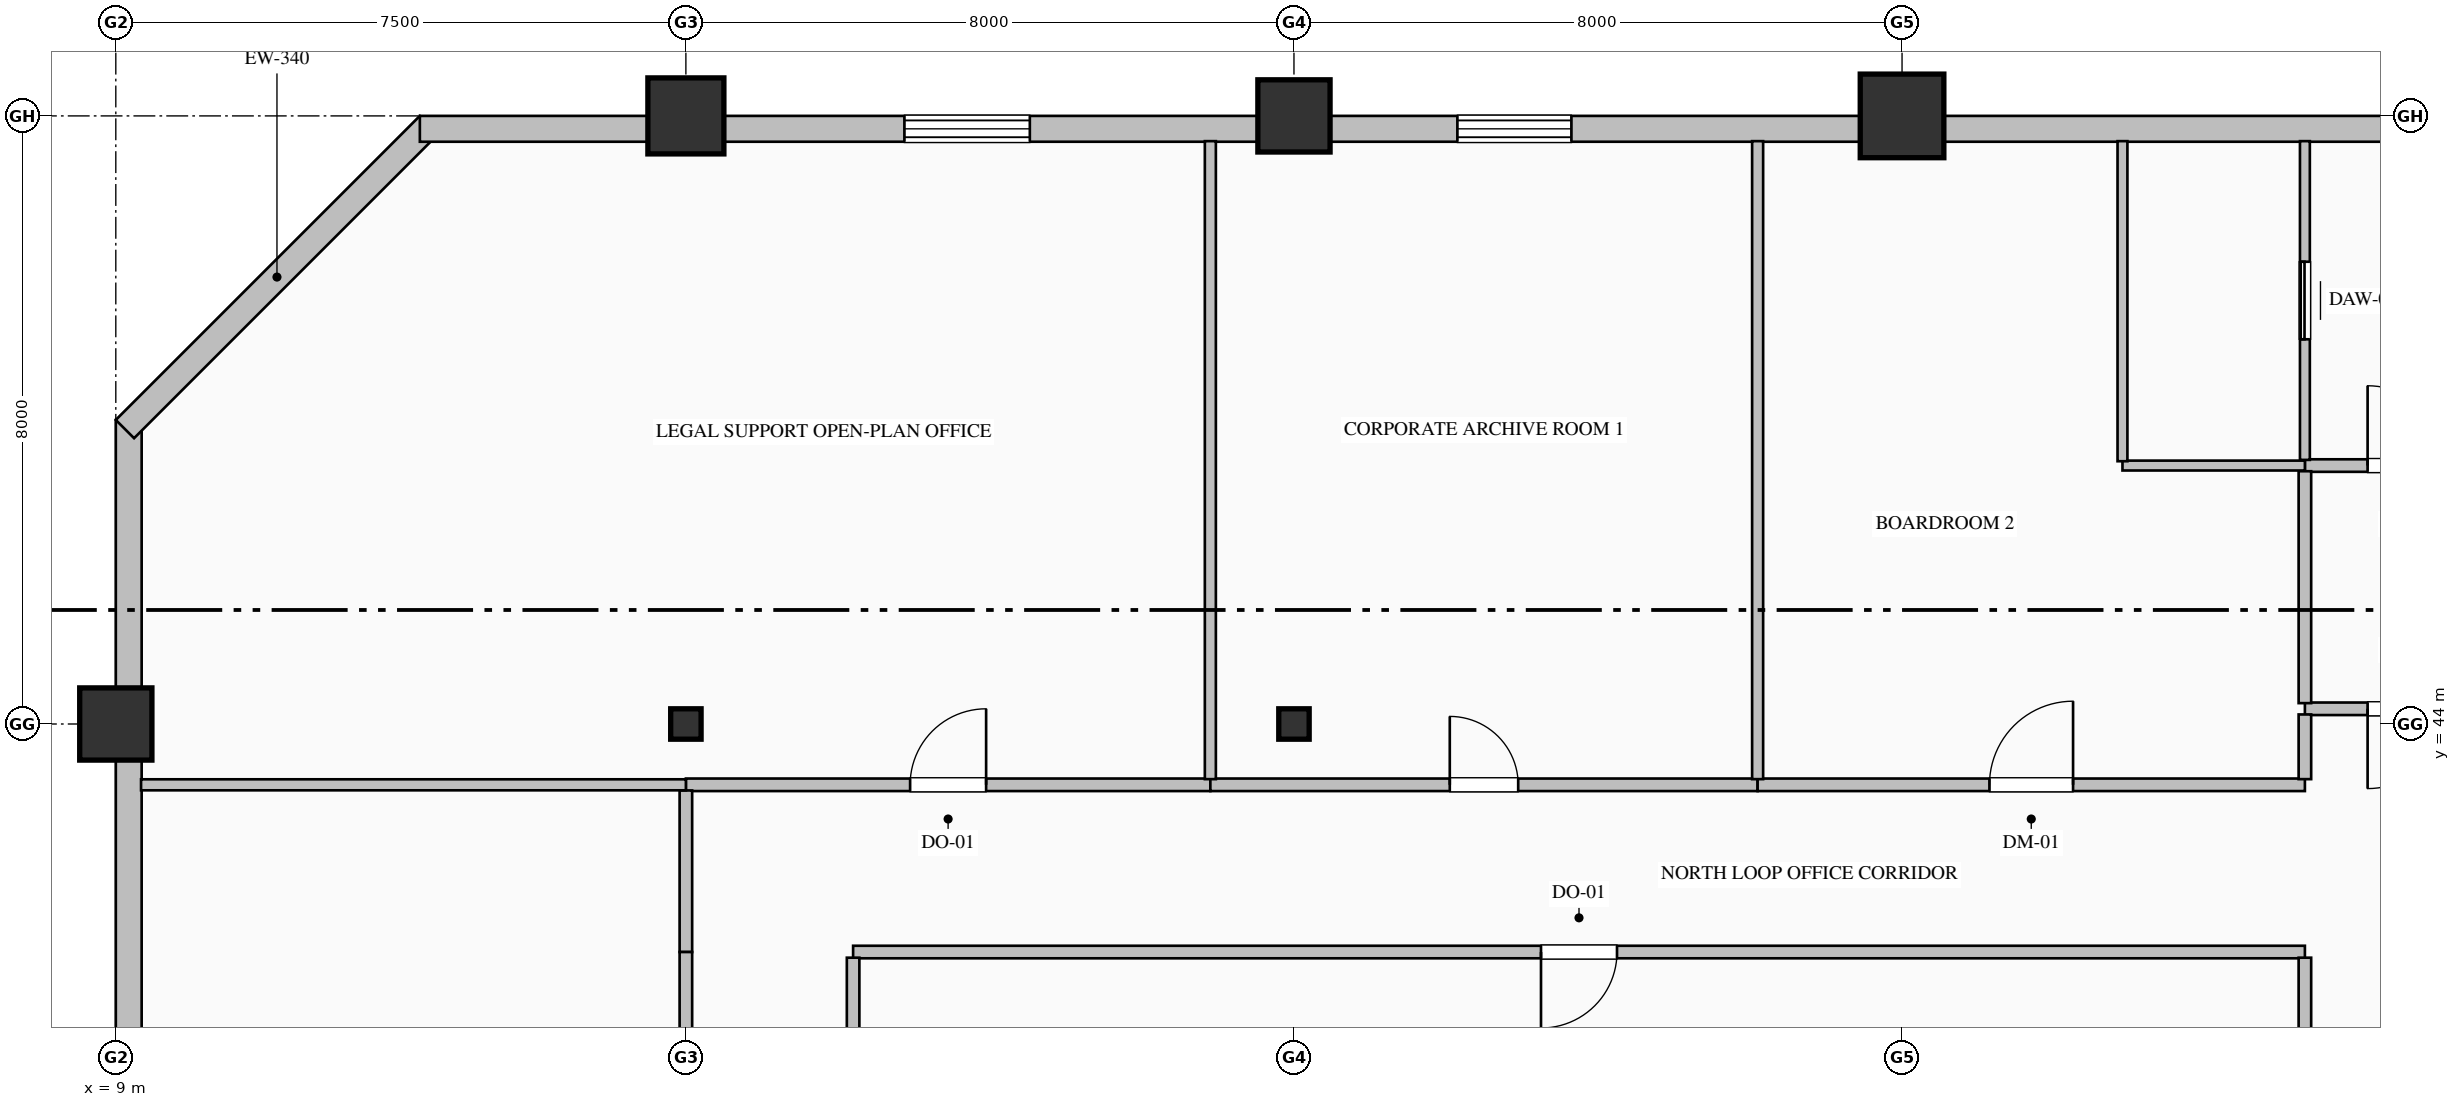
"""IFC4 building model, lengths in metres.
Left out: names, types, materials, properties, quantities, classifications, styles, units other than length and angle.
Written with IfcOpenShell. Run it as: python <this file> out.ifc"""

import sys

from ifc_helpers import new_model, si_unit, direction, frame, frame_2d, origin, origin_2d, place, context, subcontext, project, spatial, rectangle, hollow_rectangle, hollow_circle, i_section, extrude, element, fill, save


model = new_model("IFC4")
c1 = context("Model", 3, precision=1e-05, world=origin(), true_north=direction((0.0, 1.0)))
c2 = subcontext(c1, "Body", "Model", "MODEL_VIEW")
j1 = project(units=[si_unit("LENGTHUNIT", "METRE"), si_unit("PLANEANGLEUNIT", "RADIAN")], contexts=[c1])
p1 = place(None, origin())
s1 = spatial("IfcSite", under=j1, at=p1, CompositionType="ELEMENT")
p2 = place(p1, origin())
s2 = spatial("IfcBuilding", under=s1, at=p2, CompositionType="ELEMENT")
p3 = place(p2, frame((0.0, 0.0, 191.0)))
s3 = spatial("IfcBuildingStorey", under=s2, at=p3, CompositionType="ELEMENT", Elevation=191.0)
p4 = place(p3, frame((9.0, 44.0, 0.0), z_axis=(0.0, 0.0, 1.0), x_axis=(1.0, 0.0, 0.0)))
e1 = element("IfcColumn", 1, at=p4, inside=s3, PredefinedType="COLUMN", context=c2, shape_type="SweptSolid", body=[
    extrude(hollow_rectangle(XDim=0.95, YDim=0.95, WallThickness=0.036, at=origin_2d()), origin(), (0.0, 0.0, 1.0), 4.0),
])
p5 = place(p3, frame((16.5, 44.0, 0.0), z_axis=(0.0, 0.0, 1.0), x_axis=(1.0, 0.0, 0.0)))
e2 = element("IfcColumn", 2, at=p5, inside=s3, PredefinedType="COLUMN", context=c2, shape_type="SweptSolid", body=[
    extrude(i_section(OverallWidth=0.4, OverallDepth=0.4, WebThickness=0.013, FlangeThickness=0.021, FilletRadius=0.022, at=origin_2d()), origin(), (0.0, 0.0, 1.0), 4.0),
])
p6 = place(p3, frame((16.5, 52.0, 0.0), z_axis=(0.0, 0.0, 1.0), x_axis=(1.0, 0.0, 0.0)))
e3 = element("IfcColumn", 3, at=p6, inside=s3, PredefinedType="COLUMN", context=c2, shape_type="SweptSolid", body=[
    extrude(hollow_circle(Radius=0.5, WallThickness=0.036, at=origin_2d()), origin(), (0.0, 0.0, 1.0), 4.0),
])
p7 = place(p3, frame((24.5, 44.0, 0.0), z_axis=(0.0, 0.0, 1.0), x_axis=(1.0, 0.0, 0.0)))
e4 = element("IfcColumn", 4, at=p7, inside=s3, PredefinedType="COLUMN", context=c2, shape_type="SweptSolid", body=[
    extrude(i_section(OverallWidth=0.4, OverallDepth=0.4, WebThickness=0.013, FlangeThickness=0.021, FilletRadius=0.022, at=origin_2d()), origin(), (0.0, 0.0, 1.0), 4.0),
])
p8 = place(p3, frame((24.5, 52.0, 0.0), z_axis=(0.0, 0.0, 1.0), x_axis=(1.0, 0.0, 0.0)))
e5 = element("IfcColumn", 5, at=p8, inside=s3, PredefinedType="COLUMN", context=c2, shape_type="SweptSolid", body=[
    extrude(hollow_rectangle(XDim=0.95, YDim=0.95, WallThickness=0.036, at=origin_2d()), origin(), (0.0, 0.0, 1.0), 4.0),
])
p9 = place(p3, frame((32.5, 52.0, 0.0), z_axis=(0.0, 0.0, 1.0), x_axis=(1.0, 0.0, 0.0)))
e6 = element("IfcColumn", 6, at=p9, inside=s3, PredefinedType="COLUMN", context=c2, shape_type="SweptSolid", body=[
    extrude(hollow_rectangle(XDim=1.1, YDim=1.1, WallThickness=0.04, at=origin_2d()), origin(), (0.0, 0.0, 1.0), 4.0),
])
p10 = place(p3, frame((9.17, 32.0, 0.0), z_axis=(0.0, 0.0, 1.0), x_axis=(0.0, 1.0, 0.0)))
e7 = element("IfcWall", 7, at=p10, inside=s3, PredefinedType="SOLIDWALL", context=c2, shape_type="SweptSolid", body=[
    extrude(rectangle(XDim=16.0, YDim=0.34, at=frame_2d((8.0, 0.0))), origin(), (0.0, 0.0, 1.0), 3.15),
])
p11 = place(p10, frame((6.6, 0.0, 0.7)))
e8 = element("IfcOpeningElement", 8, at=p11, cuts=e7, PredefinedType="OPENING", context=c2, shape_type="SweptSolid", body=[
    extrude(rectangle(XDim=1.2, YDim=1.85, at=frame_2d((0.6, 0.925))), frame((0.0, 0.18, 0.0), z_axis=(0.0, -1.0, 0.0), x_axis=(1.0, 0.0, 0.0)), (0.0, 0.0, 1.0), 0.36),
])
p12 = place(p3, frame((9.12, 47.88, 0.0), z_axis=(0.0, 0.0, 1.0), x_axis=(0.707106781187, 0.707106781187, 0.0)))
e9 = element("IfcWall", 9, at=p12, inside=s3, PredefinedType="SOLIDWALL", context=c2, shape_type="SweptSolid", body=[
    extrude(rectangle(XDim=5.657, YDim=0.34, at=frame_2d((2.828, 0.0))), origin(), (0.0, 0.0, 1.0), 3.65),
])
p13 = place(p3, frame((13.0, 51.83, 0.0), z_axis=(0.0, 0.0, 1.0), x_axis=(1.0, 0.0, 0.0)))
e10 = element("IfcWall", 10, at=p13, inside=s3, PredefinedType="SOLIDWALL", context=c2, shape_type="SweptSolid", body=[
    extrude(rectangle(XDim=27.52, YDim=0.34, at=frame_2d((13.76, 0.0))), origin(), (0.0, 0.0, 1.0), 3.15),
])
p14 = place(p13, frame((6.375, 0.0, 0.85)))
e11 = element("IfcOpeningElement", 11, at=p14, cuts=e10, PredefinedType="OPENING", context=c2, shape_type="SweptSolid", body=[
    extrude(rectangle(XDim=1.65, YDim=1.95, at=frame_2d((0.825, 0.975))), frame((0.0, 0.18, 0.0), z_axis=(0.0, -1.0, 0.0), x_axis=(1.0, 0.0, 0.0)), (0.0, 0.0, 1.0), 0.36),
])
p15 = place(p13, frame((13.65, 0.0, 0.85)))
e12 = element("IfcOpeningElement", 12, at=p15, cuts=e10, PredefinedType="OPENING", context=c2, shape_type="SweptSolid", body=[
    extrude(rectangle(XDim=1.5, YDim=1.95, at=frame_2d((0.75, 0.975))), frame((0.0, 0.18, 0.0), z_axis=(0.0, -1.0, 0.0), x_axis=(1.0, 0.0, 0.0)), (0.0, 0.0, 1.0), 0.36),
])
p16 = place(p3, frame((37.8, 47.4, 0.0), z_axis=(0.0, 0.0, 1.0), x_axis=(1.0, 0.0, 0.0)))
e13 = element("IfcWall", 13, at=p16, inside=s3, PredefinedType="PARTITIONING", context=c2, shape_type="SweptSolid", body=[
    extrude(rectangle(XDim=2.7, YDim=0.165, at=frame_2d((1.35, 0.0))), origin(), (0.0, 0.0, 1.0), 3.65),
])
p17 = place(p16, frame((0.825, 0.0, 0.0)))
e14 = element("IfcOpeningElement", 14, at=p17, cuts=e13, PredefinedType="OPENING", context=c2, shape_type="SweptSolid", body=[
    extrude(rectangle(XDim=1.05, YDim=2.15, at=frame_2d((0.525, 1.075))), frame((0.0, 0.093, 0.0), z_axis=(0.0, -1.0, 0.0), x_axis=(1.0, 0.0, 0.0)), (0.0, 0.0, 1.0), 0.185),
])
p18 = place(p3, frame((40.5, 44.2, 0.0), z_axis=(0.0, 0.0, 1.0), x_axis=(-1.0, 0.0, 0.0)))
e15 = element("IfcWall", 15, at=p18, inside=s3, PredefinedType="PARTITIONING", context=c2, shape_type="SweptSolid", body=[
    extrude(rectangle(XDim=2.7, YDim=0.165, at=frame_2d((1.35, 0.0))), origin(), (0.0, 0.0, 1.0), 3.65),
])
p19 = place(p18, frame((0.825, 0.0, 0.0)))
e16 = element("IfcOpeningElement", 16, at=p19, cuts=e15, PredefinedType="OPENING", context=c2, shape_type="SweptSolid", body=[
    extrude(rectangle(XDim=1.05, YDim=2.15, at=frame_2d((0.525, 1.075))), frame((0.0, 0.093, 0.0), z_axis=(0.0, -1.0, 0.0), x_axis=(1.0, 0.0, 0.0)), (0.0, 0.0, 1.0), 0.185),
])
p20 = place(p3, frame((37.8, 44.274, 0.0), z_axis=(0.0, 0.0, 1.0), x_axis=(0.0, 1.0, 0.0)))
e17 = element("IfcWall", 17, at=p20, inside=s3, PredefinedType="PARTITIONING", context=c2, shape_type="SweptSolid", body=[
    extrude(rectangle(XDim=3.051, YDim=0.165, at=frame_2d((1.525, 0.0))), origin(), (0.0, 0.0, 1.0), 3.65),
])
p21 = place(p3, frame((37.8, 47.475, 0.0), z_axis=(0.0, 0.0, 1.0), x_axis=(0.0, 1.0, 0.0)))
e18 = element("IfcWall", 18, at=p21, inside=s3, PredefinedType="PARTITIONING", context=c2, shape_type="SweptSolid", body=[
    extrude(rectangle(XDim=4.193, YDim=0.13, at=frame_2d((2.097, 0.0))), origin(), (0.0, 0.0, 1.0), 3.65),
])
p22 = place(p21, frame((1.587, 0.0, 0.0)))
e19 = element("IfcOpeningElement", 19, at=p22, cuts=e18, PredefinedType="OPENING", context=c2, shape_type="SweptSolid", body=[
    extrude(rectangle(XDim=1.02, YDim=2.15, at=frame_2d((0.51, 1.075))), frame((0.0, 0.075, 0.0), z_axis=(0.0, -1.0, 0.0), x_axis=(1.0, 0.0, 0.0)), (0.0, 0.0, 1.0), 0.15),
])
p23 = place(p3, frame((37.8, 47.4, 0.0), z_axis=(0.0, 0.0, 1.0), x_axis=(-1.0, 0.0, 0.0)))
e20 = element("IfcWall", 20, at=p23, inside=s3, PredefinedType="PARTITIONING", context=c2, shape_type="SweptSolid", body=[
    extrude(rectangle(XDim=2.4, YDim=0.13, at=frame_2d((1.2, 0.0))), origin(), (0.0, 0.0, 1.0), 3.65),
])
p24 = place(p3, frame((35.4, 47.457, 0.0), z_axis=(0.0, 0.0, 1.0), x_axis=(0.0, 1.0, 0.0)))
e21 = element("IfcWall", 21, at=p24, inside=s3, PredefinedType="PARTITIONING", context=c2, shape_type="SweptSolid", body=[
    extrude(rectangle(XDim=4.211, YDim=0.13, at=frame_2d((2.105, 0.0))), origin(), (0.0, 0.0, 1.0), 3.65),
])
p25 = place(p3, frame((16.5, 43.2, 0.0), z_axis=(0.0, 0.0, 1.0), x_axis=(1.0, 0.0, 0.0)))
e22 = element("IfcWall", 22, at=p25, inside=s3, PredefinedType="PARTITIONING", context=c2, shape_type="SweptSolid", body=[
    extrude(rectangle(XDim=6.9, YDim=0.165, at=frame_2d((3.45, 0.0))), origin(), (0.0, 0.0, 1.0), 3.65),
])
p26 = place(p25, frame((2.95, 0.0, 0.0)))
e23 = element("IfcOpeningElement", 23, at=p26, cuts=e22, PredefinedType="OPENING", context=c2, shape_type="SweptSolid", body=[
    extrude(rectangle(XDim=1.0, YDim=2.15, at=frame_2d((0.5, 1.075))), frame((0.0, 0.093, 0.0), z_axis=(0.0, -1.0, 0.0), x_axis=(1.0, 0.0, 0.0)), (0.0, 0.0, 1.0), 0.185),
])
p27 = place(p3, frame((23.4, 43.2, 0.0), z_axis=(0.0, 0.0, 1.0), x_axis=(1.0, 0.0, 0.0)))
e24 = element("IfcWall", 24, at=p27, inside=s3, PredefinedType="PARTITIONING", context=c2, shape_type="SweptSolid", body=[
    extrude(rectangle(XDim=7.2, YDim=0.165, at=frame_2d((3.6, 0.0))), origin(), (0.0, 0.0, 1.0), 3.65),
])
p28 = place(p27, frame((3.15, 0.0, 0.0)))
e25 = element("IfcOpeningElement", 25, at=p28, cuts=e24, PredefinedType="OPENING", context=c2, shape_type="SweptSolid", body=[
    extrude(rectangle(XDim=0.9, YDim=2.15, at=frame_2d((0.45, 1.075))), frame((0.0, 0.093, 0.0), z_axis=(0.0, -1.0, 0.0), x_axis=(1.0, 0.0, 0.0)), (0.0, 0.0, 1.0), 0.185),
])
p29 = place(p3, frame((30.6, 43.2, 0.0), z_axis=(0.0, 0.0, 1.0), x_axis=(1.0, 0.0, 0.0)))
e26 = element("IfcWall", 26, at=p29, inside=s3, PredefinedType="PARTITIONING", context=c2, shape_type="SweptSolid", body=[
    extrude(rectangle(XDim=7.2, YDim=0.165, at=frame_2d((3.6, 0.0))), origin(), (0.0, 0.0, 1.0), 3.65),
])
p30 = place(p29, frame((3.05, 0.0, 0.0)))
e27 = element("IfcOpeningElement", 27, at=p30, cuts=e26, PredefinedType="OPENING", context=c2, shape_type="SweptSolid", body=[
    extrude(rectangle(XDim=1.1, YDim=2.2, at=frame_2d((0.55, 1.1))), frame((0.0, 0.093, 0.0), z_axis=(0.0, -1.0, 0.0), x_axis=(1.0, 0.0, 0.0)), (0.0, 0.0, 1.0), 0.185),
])
p31 = place(p3, frame((37.8, 41.0, 0.0), z_axis=(0.0, 0.0, 1.0), x_axis=(-1.0, 0.0, 0.0)))
e28 = element("IfcWall", 28, at=p31, inside=s3, PredefinedType="PARTITIONING", context=c2, shape_type="SweptSolid", body=[
    extrude(rectangle(XDim=19.1, YDim=0.165, at=frame_2d((9.55, 0.0))), origin(), (0.0, 0.0, 1.0), 3.65),
])
p32 = place(p31, frame((9.05, 0.0, 0.0)))
e29 = element("IfcOpeningElement", 29, at=p32, cuts=e28, PredefinedType="OPENING", context=c2, shape_type="SweptSolid", body=[
    extrude(rectangle(XDim=1.0, YDim=2.15, at=frame_2d((0.5, 1.075))), frame((0.0, 0.093, 0.0), z_axis=(0.0, -1.0, 0.0), x_axis=(1.0, 0.0, 0.0)), (0.0, 0.0, 1.0), 0.185),
])
p33 = place(p3, frame((16.5, 41.0, 0.0), z_axis=(0.0, 0.0, 1.0), x_axis=(0.0, 1.0, 0.0)))
e30 = element("IfcWall", 30, at=p33, inside=s3, PredefinedType="PARTITIONING", context=c2, shape_type="SweptSolid", body=[
    extrude(rectangle(XDim=2.125, YDim=0.165, at=frame_2d((1.063, 0.0))), origin(), (0.0, 0.0, 1.0), 3.042),
])
p34 = place(p3, frame((18.7, 40.926, 0.0), z_axis=(0.0, 0.0, 1.0), x_axis=(0.0, -1.0, 0.0)))
e31 = element("IfcWall", 31, at=p34, inside=s3, PredefinedType="PARTITIONING", context=c2, shape_type="SweptSolid", body=[
    extrude(rectangle(XDim=3.661, YDim=0.165, at=frame_2d((1.831, 0.0))), origin(), (0.0, 0.0, 1.0), 3.65),
])
p35 = place(p3, frame((16.5, 33.4, 0.0), z_axis=(0.0, 0.0, 1.0), x_axis=(0.0, 1.0, 0.0)))
e32 = element("IfcWall", 32, at=p35, inside=s3, PredefinedType="PARTITIONING", context=c2, shape_type="SweptSolid", body=[
    extrude(rectangle(XDim=7.6, YDim=0.165, at=frame_2d((3.8, 0.0))), origin(), (0.0, 0.0, 1.0), 3.042),
])
p36 = place(p35, frame((3.3, 0.0, 0.0)))
e33 = element("IfcOpeningElement", 33, at=p36, cuts=e32, PredefinedType="OPENING", context=c2, shape_type="SweptSolid", body=[
    extrude(rectangle(XDim=1.0, YDim=2.15, at=frame_2d((0.5, 1.075))), frame((0.0, 0.093, 0.0), z_axis=(0.0, -1.0, 0.0), x_axis=(1.0, 0.0, 0.0)), (0.0, 0.0, 1.0), 0.185),
])
p37 = place(p3, frame((37.8, 43.274, 0.0), z_axis=(0.0, 0.0, 1.0), x_axis=(0.0, 1.0, 0.0)))
e34 = element("IfcWall", 34, at=p37, inside=s3, PredefinedType="PARTITIONING", context=c2, shape_type="SweptSolid", body=[
    extrude(rectangle(XDim=0.851, YDim=0.165, at=frame_2d((0.426, 0.0))), origin(), (0.0, 0.0, 1.0), 3.65),
])
p38 = place(p3, frame((37.8, 37.264, 0.0), z_axis=(0.0, 0.0, 1.0), x_axis=(0.0, 1.0, 0.0)))
e35 = element("IfcWall", 35, at=p38, inside=s3, PredefinedType="PARTITIONING", context=c2, shape_type="SweptSolid", body=[
    extrude(rectangle(XDim=3.661, YDim=0.165, at=frame_2d((1.831, 0.0))), origin(), (0.0, 0.0, 1.0), 3.65),
])
p39 = place(p3, frame((23.4, 51.668, 0.0), z_axis=(0.0, 0.0, 1.0), x_axis=(0.0, -1.0, 0.0)))
e36 = element("IfcWall", 36, at=p39, inside=s3, PredefinedType="PARTITIONING", context=c2, shape_type="SweptSolid", body=[
    extrude(rectangle(XDim=8.394, YDim=0.145, at=frame_2d((4.197, 0.0))), origin(), (0.0, 0.0, 1.0), 3.65),
])
p40 = place(p3, frame((16.5, 43.2, 0.0), z_axis=(0.0, 0.0, 1.0), x_axis=(-1.0, 0.0, 0.0)))
e37 = element("IfcWall", 37, at=p40, inside=s3, PredefinedType="PARTITIONING", context=c2, shape_type="SweptSolid", body=[
    extrude(rectangle(XDim=7.168, YDim=0.145, at=frame_2d((3.584, 0.0))), origin(), (0.0, 0.0, 1.0), 3.65),
])
p41 = place(p3, frame((30.6, 51.668, 0.0), z_axis=(0.0, 0.0, 1.0), x_axis=(0.0, -1.0, 0.0)))
e38 = element("IfcWall", 38, at=p41, inside=s3, PredefinedType="PARTITIONING", context=c2, shape_type="SweptSolid", body=[
    extrude(rectangle(XDim=8.394, YDim=0.145, at=frame_2d((4.197, 0.0))), origin(), (0.0, 0.0, 1.0), 3.65),
])
p42 = place(p14, origin())
e39 = element("IfcWindow", 39, at=p42, inside=s3, PartitioningType="DOUBLE_PANEL_VERTICAL", PredefinedType="WINDOW", context=c2, shape_type="SweptSolid", body=[
    extrude(rectangle(XDim=1.65, YDim=1.95, at=frame_2d((0.825, 0.975))), frame((0.0, 0.15, 0.0), z_axis=(0.0, -1.0, 0.0), x_axis=(1.0, 0.0, 0.0)), (0.0, 0.0, 1.0), 0.06),
])
fill(e11, e39)
p43 = place(p15, origin())
e40 = element("IfcWindow", 40, at=p43, inside=s3, PartitioningType="DOUBLE_PANEL_VERTICAL", PredefinedType="WINDOW", context=c2, shape_type="SweptSolid", body=[
    extrude(rectangle(XDim=1.5, YDim=1.95, at=frame_2d((0.75, 0.975))), frame((0.0, 0.15, 0.0), z_axis=(0.0, -1.0, 0.0), x_axis=(1.0, 0.0, 0.0)), (0.0, 0.0, 1.0), 0.06),
])
fill(e12, e40)
p44 = place(p17, origin())
e41 = element("IfcDoor", 41, at=p44, inside=s3, OperationType="SINGLE_SWING_LEFT", PredefinedType="DOOR", context=c2, shape_type="SweptSolid", body=[
    extrude(rectangle(XDim=1.05, YDim=2.15, at=frame_2d((0.525, 1.075))), frame((0.0, 0.025, 0.0), z_axis=(0.0, -1.0, 0.0), x_axis=(1.0, 0.0, 0.0)), (0.0, 0.0, 1.0), 0.05),
])
fill(e14, e41)
p45 = place(p19, origin())
e42 = element("IfcDoor", 42, at=p45, inside=s3, OperationType="SINGLE_SWING_RIGHT", PredefinedType="DOOR", context=c2, shape_type="SweptSolid", body=[
    extrude(rectangle(XDim=1.05, YDim=2.15, at=frame_2d((0.525, 1.075))), frame((0.0, 0.025, 0.0), z_axis=(0.0, -1.0, 0.0), x_axis=(1.0, 0.0, 0.0)), (0.0, 0.0, 1.0), 0.05),
])
fill(e16, e42)
p46 = place(p22, origin())
e43 = element("IfcDoor", 43, at=p46, inside=s3, OperationType="SLIDING_TO_LEFT", PredefinedType="DOOR", context=c2, shape_type="SweptSolid", body=[
    extrude(rectangle(XDim=1.02, YDim=2.15, at=frame_2d((0.51, 1.075))), frame((0.0, 0.025, 0.0), z_axis=(0.0, -1.0, 0.0), x_axis=(1.0, 0.0, 0.0)), (0.0, 0.0, 1.0), 0.05),
])
fill(e19, e43)
p47 = place(p26, origin())
e44 = element("IfcDoor", 44, at=p47, inside=s3, OperationType="SINGLE_SWING_RIGHT", PredefinedType="DOOR", context=c2, shape_type="SweptSolid", body=[
    extrude(rectangle(XDim=1.0, YDim=2.15, at=frame_2d((0.5, 1.075))), frame((0.0, 0.025, 0.0), z_axis=(0.0, -1.0, 0.0), x_axis=(1.0, 0.0, 0.0)), (0.0, 0.0, 1.0), 0.05),
])
fill(e23, e44)
p48 = place(p28, origin())
e45 = element("IfcDoor", 45, at=p48, inside=s3, OperationType="SINGLE_SWING_LEFT", PredefinedType="DOOR", context=c2, shape_type="SweptSolid", body=[
    extrude(rectangle(XDim=0.9, YDim=2.15, at=frame_2d((0.45, 1.075))), frame((0.0, 0.025, 0.0), z_axis=(0.0, -1.0, 0.0), x_axis=(1.0, 0.0, 0.0)), (0.0, 0.0, 1.0), 0.05),
])
fill(e25, e45)
p49 = place(p30, origin())
e46 = element("IfcDoor", 46, at=p49, inside=s3, OperationType="SINGLE_SWING_RIGHT", PredefinedType="DOOR", context=c2, shape_type="SweptSolid", body=[
    extrude(rectangle(XDim=1.1, YDim=2.2, at=frame_2d((0.55, 1.1))), frame((0.0, 0.025, 0.0), z_axis=(0.0, -1.0, 0.0), x_axis=(1.0, 0.0, 0.0)), (0.0, 0.0, 1.0), 0.05),
])
fill(e27, e46)
p50 = place(p32, origin())
e47 = element("IfcDoor", 47, at=p50, inside=s3, OperationType="SINGLE_SWING_RIGHT", PredefinedType="DOOR", context=c2, shape_type="SweptSolid", body=[
    extrude(rectangle(XDim=1.0, YDim=2.15, at=frame_2d((0.5, 1.075))), frame((0.0, 0.025, 0.0), z_axis=(0.0, -1.0, 0.0), x_axis=(1.0, 0.0, 0.0)), (0.0, 0.0, 1.0), 0.05),
])
fill(e29, e47)
save(model, sys.argv[1])
